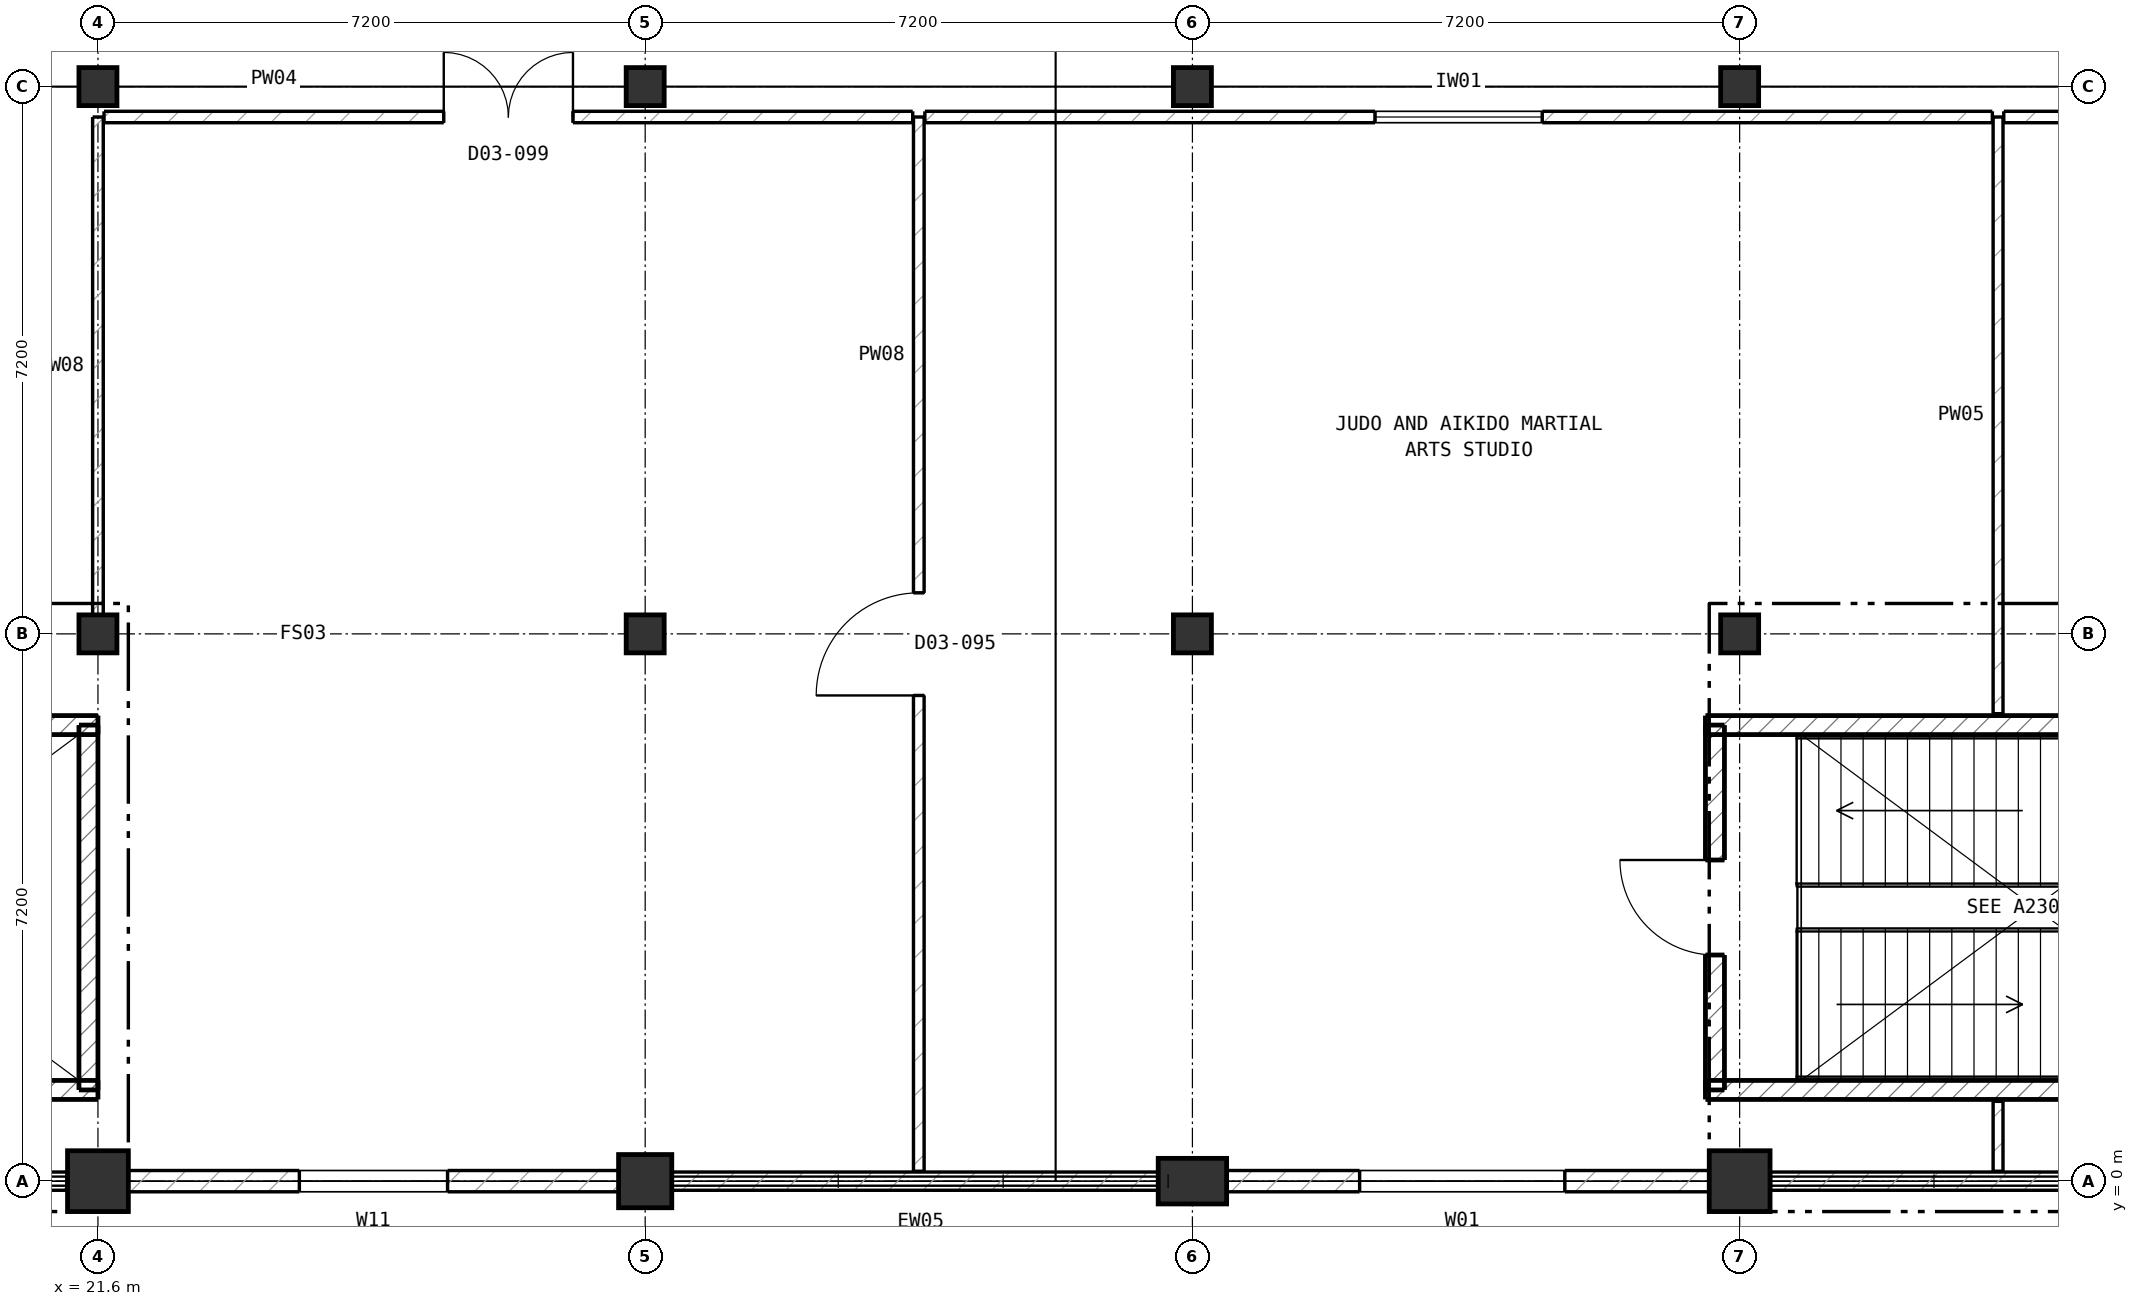
"""IFC4 building model, lengths in metres.
Left out: names, types, materials, properties, quantities, classifications, styles, units other than length and angle.
Written with IfcOpenShell. Run it as: python <this file> out.ifc"""

import sys

from ifc_helpers import new_model, si_unit, direction, frame, frame_2d, origin, origin_2d, place, context, subcontext, project, spatial, rectangle, extrude, element, fill, save


model = new_model("IFC4")
c1 = context("Model", 3, precision=1e-05, world=origin(), true_north=direction((0.0, 1.0)))
c2 = subcontext(c1, "Body", "Model", "MODEL_VIEW")
j1 = project(units=[si_unit("LENGTHUNIT", "METRE"), si_unit("PLANEANGLEUNIT", "RADIAN")], contexts=[c1])
p1 = place(None, origin())
s1 = spatial("IfcSite", under=j1, at=p1, CompositionType="ELEMENT")
p2 = place(p1, origin())
s2 = spatial("IfcBuilding", under=s1, at=p2, CompositionType="ELEMENT")
p3 = place(p2, frame((0.0, 0.0, 16.0)))
s3 = spatial("IfcBuildingStorey", under=s2, at=p3, CompositionType="ELEMENT", Elevation=16.0)
p4 = place(p3, frame((21.6, 0.0, 0.0), z_axis=(0.0, 0.0, 1.0), x_axis=(1.0, 0.0, 0.0)))
e1 = element("IfcColumn", 1, at=p4, inside=s3, PredefinedType="COLUMN", context=c2, shape_type="SweptSolid", body=[
    extrude(rectangle(XDim=0.8, YDim=0.8, at=origin_2d()), origin(), (0.0, 0.0, 1.0), 4.4),
])
for number, where, z_axis, x_axis in (
    (2, (21.6, 7.2, 0.0), (0.0, 0.0, 1.0), (1.0, 0.0, 0.0)),
    (3, (21.6, 14.4, 0.0), (0.0, 0.0, 1.0), (1.0, 0.0, 0.0)),
):
    element("IfcColumn", number, at=place(p3, frame(where, z_axis=z_axis, x_axis=x_axis)), inside=s3, PredefinedType="COLUMN", context=c2, shape_type="SweptSolid", body=[
        extrude(rectangle(XDim=0.5, YDim=0.5, at=origin_2d()), origin(), (0.0, 0.0, 1.0), 4.4),
    ])
p5 = place(p3, frame((28.8, 0.0, 0.0), z_axis=(0.0, 0.0, 1.0), x_axis=(1.0, 0.0, 0.0)))
e4 = element("IfcColumn", 4, at=p5, inside=s3, PredefinedType="COLUMN", context=c2, shape_type="SweptSolid", body=[
    extrude(rectangle(XDim=0.7, YDim=0.7, at=origin_2d()), origin(), (0.0, 0.0, 1.0), 4.4),
])
for number, where, z_axis, x_axis in (
    (5, (28.8, 7.2, 0.0), (0.0, 0.0, 1.0), (1.0, 0.0, 0.0)),
    (6, (28.8, 14.4, 0.0), (0.0, 0.0, 1.0), (1.0, 0.0, 0.0)),
):
    element("IfcColumn", number, at=place(p3, frame(where, z_axis=z_axis, x_axis=x_axis)), inside=s3, PredefinedType="COLUMN", context=c2, shape_type="SweptSolid", body=[
        extrude(rectangle(XDim=0.5, YDim=0.5, at=origin_2d()), origin(), (0.0, 0.0, 1.0), 4.4),
    ])
p6 = place(p3, frame((36.0, 0.0, 0.0), z_axis=(0.0, 0.0, 1.0), x_axis=(1.0, 0.0, 0.0)))
e7 = element("IfcColumn", 7, at=p6, inside=s3, PredefinedType="COLUMN", context=c2, shape_type="SweptSolid", body=[
    extrude(rectangle(XDim=0.6, YDim=0.9, at=origin_2d()), origin(), (0.0, 0.0, 1.0), 4.4),
])
for number, where, z_axis, x_axis in (
    (8, (36.0, 7.2, 0.0), (0.0, 0.0, 1.0), (1.0, 0.0, 0.0)),
    (9, (36.0, 14.4, 0.0), (0.0, 0.0, 1.0), (1.0, 0.0, 0.0)),
):
    element("IfcColumn", number, at=place(p3, frame(where, z_axis=z_axis, x_axis=x_axis)), inside=s3, PredefinedType="COLUMN", context=c2, shape_type="SweptSolid", body=[
        extrude(rectangle(XDim=0.5, YDim=0.5, at=origin_2d()), origin(), (0.0, 0.0, 1.0), 4.4),
    ])
p7 = place(p3, frame((43.2, 0.0, 0.0), z_axis=(0.0, 0.0, 1.0), x_axis=(1.0, 0.0, 0.0)))
e10 = element("IfcColumn", 10, at=p7, inside=s3, PredefinedType="COLUMN", context=c2, shape_type="SweptSolid", body=[
    extrude(rectangle(XDim=0.8, YDim=0.8, at=origin_2d()), origin(), (0.0, 0.0, 1.0), 4.4),
])
for number, where, z_axis, x_axis in (
    (11, (43.2, 7.2, 0.0), (0.0, 0.0, 1.0), (1.0, 0.0, 0.0)),
    (12, (43.2, 14.4, 0.0), (0.0, 0.0, 1.0), (1.0, 0.0, 0.0)),
):
    element("IfcColumn", number, at=place(p3, frame(where, z_axis=z_axis, x_axis=x_axis)), inside=s3, PredefinedType="COLUMN", context=c2, shape_type="SweptSolid", body=[
        extrude(rectangle(XDim=0.5, YDim=0.5, at=origin_2d()), origin(), (0.0, 0.0, 1.0), 4.4),
    ])
p8 = place(p3, frame((50.065, 0.0, 0.0), z_axis=(0.0, 0.0, 1.0), x_axis=(-1.0, 0.0, 0.0)))
e13 = element("IfcWall", 13, at=p8, inside=s3, PredefinedType="SOLIDWALL", context=c2, shape_type="SweptSolid", body=[
    extrude(rectangle(XDim=6.48, YDim=0.24, at=frame_2d((3.24, 0.0))), origin(), (0.0, 0.0, 1.0), 0.35),
])
p9 = place(p3, frame((42.815, 0.0, 0.0), z_axis=(0.0, 0.0, 1.0), x_axis=(-1.0, 0.0, 0.0)))
e14 = element("IfcWall", 14, at=p9, inside=s3, PredefinedType="SOLIDWALL", context=c2, shape_type="SweptSolid", body=[
    extrude(rectangle(XDim=6.53, YDim=0.28, at=frame_2d((3.265, 0.0))), origin(), (0.0, 0.0, 1.0), 3.675),
])
p10 = place(p9, frame((1.915, 0.0, 0.9)))
e15 = element("IfcOpeningElement", 15, at=p10, cuts=e14, PredefinedType="OPENING", context=c2, shape_type="SweptSolid", body=[
    extrude(rectangle(XDim=2.7, YDim=2.1, at=frame_2d((1.35, 1.05))), frame((0.0, 0.15, 0.0), z_axis=(0.0, -1.0, 0.0), x_axis=(1.0, 0.0, 0.0)), (0.0, 0.0, 1.0), 0.3),
])
p11 = place(p3, frame((35.715, 0.0, 0.0), z_axis=(0.0, 0.0, 1.0), x_axis=(-1.0, 0.0, 0.0)))
e16 = element("IfcWall", 16, at=p11, inside=s3, PredefinedType="SOLIDWALL", context=c2, shape_type="SweptSolid", body=[
    extrude(rectangle(XDim=6.58, YDim=0.24, at=frame_2d((3.29, 0.0))), origin(), (0.0, 0.0, 1.0), 0.35),
])
p12 = place(p3, frame((28.465, 0.0, 0.0), z_axis=(0.0, 0.0, 1.0), x_axis=(-1.0, 0.0, 0.0)))
e17 = element("IfcWall", 17, at=p12, inside=s3, PredefinedType="SOLIDWALL", context=c2, shape_type="SweptSolid", body=[
    extrude(rectangle(XDim=6.48, YDim=0.28, at=frame_2d((3.24, 0.0))), origin(), (0.0, 0.0, 1.0), 3.675),
])
p13 = place(p12, frame((2.265, 0.0, 1.0)))
e18 = element("IfcOpeningElement", 18, at=p13, cuts=e17, PredefinedType="OPENING", context=c2, shape_type="SweptSolid", body=[
    extrude(rectangle(XDim=1.95, YDim=1.65, at=frame_2d((0.975, 0.825))), frame((0.0, 0.15, 0.0), z_axis=(0.0, -1.0, 0.0), x_axis=(1.0, 0.0, 0.0)), (0.0, 0.0, 1.0), 0.3),
])
p14 = place(p3, frame((21.215, 0.0, 0.0), z_axis=(0.0, 0.0, 1.0), x_axis=(-1.0, 0.0, 0.0)))
e19 = element("IfcWall", 19, at=p14, inside=s3, PredefinedType="SOLIDWALL", context=c2, shape_type="SweptSolid", body=[
    extrude(rectangle(XDim=6.53, YDim=0.24, at=frame_2d((3.265, 0.0))), origin(), (0.0, 0.0, 1.0), 0.35),
])
p15 = place(p3, frame((13.95, 6.0, 0.0), z_axis=(0.0, 0.0, 1.0), x_axis=(1.0, 0.0, 0.0)))
e20 = element("IfcWall", 20, at=p15, inside=s3, PredefinedType="SHEAR", context=c2, shape_type="SweptSolid", body=[
    extrude(rectangle(XDim=7.65, YDim=0.25, at=frame_2d((3.825, 0.0))), origin(), (0.0, 0.0, 1.0), 4.4),
])
p16 = place(p3, frame((21.475, 6.0, 0.0), z_axis=(0.0, 0.0, 1.0), x_axis=(0.0, -1.0, 0.0)))
e21 = element("IfcWall", 21, at=p16, inside=s3, PredefinedType="SHEAR", context=c2, shape_type="SweptSolid", body=[
    extrude(rectangle(XDim=4.8, YDim=0.25, at=frame_2d((2.4, 0.0))), origin(), (0.0, 0.0, 1.0), 4.4),
])
p17 = place(p3, frame((21.6, 1.2, 0.0), z_axis=(0.0, 0.0, 1.0), x_axis=(-1.0, 0.0, 0.0)))
e22 = element("IfcWall", 22, at=p17, inside=s3, PredefinedType="SHEAR", context=c2, shape_type="SweptSolid", body=[
    extrude(rectangle(XDim=7.65, YDim=0.25, at=frame_2d((3.825, 0.0))), origin(), (0.0, 0.0, 1.0), 4.4),
])
p18 = place(p3, frame((42.875, 1.2, 0.0), z_axis=(0.0, 0.0, 1.0), x_axis=(0.0, 1.0, 0.0)))
e23 = element("IfcWall", 23, at=p18, inside=s3, PredefinedType="SHEAR", context=c2, shape_type="SweptSolid", body=[
    extrude(rectangle(XDim=4.8, YDim=0.25, at=frame_2d((2.4, 0.0))), origin(), (0.0, 0.0, 1.0), 4.4),
])
p19 = place(p18, frame((1.775, 0.0, 0.0)))
e24 = element("IfcOpeningElement", 24, at=p19, cuts=e23, PredefinedType="OPENING", context=c2, shape_type="SweptSolid", body=[
    extrude(rectangle(XDim=1.25, YDim=2.2, at=frame_2d((0.625, 1.1))), frame((0.0, 0.135, 0.0), z_axis=(0.0, -1.0, 0.0), x_axis=(1.0, 0.0, 0.0)), (0.0, 0.0, 1.0), 0.27),
])
for number, where, z_axis, x_axis in (
    (25, (42.75, 6.0, 0.0), (0.0, 0.0, 1.0), (1.0, 0.0, 0.0)),
    (26, (50.4, 1.2, 0.0), (0.0, 0.0, 1.0), (-1.0, 0.0, 0.0)),
):
    element("IfcWall", number, at=place(p3, frame(where, z_axis=z_axis, x_axis=x_axis)), inside=s3, PredefinedType="SHEAR", context=c2, shape_type="SweptSolid", body=[
        extrude(rectangle(XDim=7.65, YDim=0.25, at=frame_2d((3.825, 0.0))), origin(), (0.0, 0.0, 1.0), 4.4),
    ])
p20 = place(p3, frame((21.6, 7.45, 0.0), z_axis=(0.0, 0.0, 1.0), x_axis=(0.0, 1.0, 0.0)))
e27 = element("IfcWall", 27, at=p20, inside=s3, PredefinedType="PARTITIONING", context=c2, shape_type="SweptSolid", body=[
    extrude(rectangle(XDim=6.55, YDim=0.14, at=frame_2d((3.275, 0.0))), origin(), (0.0, 0.0, 1.0), 3.61),
])
p21 = place(p3, frame((46.6, 0.13, 0.0), z_axis=(0.0, 0.0, 1.0), x_axis=(0.0, 1.0, 0.0)))
e28 = element("IfcWall", 28, at=p21, inside=s3, PredefinedType="PARTITIONING", context=c2, shape_type="SweptSolid", body=[
    extrude(rectangle(XDim=0.92, YDim=0.13, at=frame_2d((0.46, 0.0))), origin(), (0.0, 0.0, 1.0), 4.12),
])
p22 = place(p3, frame((46.6, 6.15, 0.0), z_axis=(0.0, 0.0, 1.0), x_axis=(0.0, 1.0, 0.0)))
e29 = element("IfcWall", 29, at=p22, inside=s3, PredefinedType="PARTITIONING", context=c2, shape_type="SweptSolid", body=[
    extrude(rectangle(XDim=7.85, YDim=0.13, at=frame_2d((3.925, 0.0))), origin(), (0.0, 0.0, 1.0), 4.11),
])
p23 = place(p3, frame((32.4, 0.13, 0.0), z_axis=(0.0, 0.0, 1.0), x_axis=(0.0, 1.0, 0.0)))
e30 = element("IfcWall", 30, at=p23, inside=s3, PredefinedType="PARTITIONING", context=c2, shape_type="SweptSolid", body=[
    extrude(rectangle(XDim=13.87, YDim=0.14, at=frame_2d((6.935, 0.0))), origin(), (0.0, 0.0, 1.0), 4.12),
])
p24 = place(p23, frame((6.26, 0.0, 0.0)))
e31 = element("IfcOpeningElement", 31, at=p24, cuts=e30, PredefinedType="OPENING", context=c2, shape_type="SweptSolid", body=[
    extrude(rectangle(XDim=1.35, YDim=2.15, at=frame_2d((0.675, 1.075))), frame((0.0, 0.08, 0.0), z_axis=(0.0, -1.0, 0.0), x_axis=(1.0, 0.0, 0.0)), (0.0, 0.0, 1.0), 0.16),
])
p25 = place(p3, frame((21.68, 14.0, 0.0), z_axis=(0.0, 0.0, 1.0), x_axis=(1.0, 0.0, 0.0)))
e32 = element("IfcWall", 32, at=p25, inside=s3, PredefinedType="PARTITIONING", context=c2, shape_type="SweptSolid", body=[
    extrude(rectangle(XDim=10.64, YDim=0.15, at=frame_2d((5.32, 0.0))), origin(), (0.0, 0.0, 1.0), 4.11),
])
p26 = place(p25, frame((4.47, 0.0, 0.0)))
e33 = element("IfcOpeningElement", 33, at=p26, cuts=e32, PredefinedType="OPENING", context=c2, shape_type="SweptSolid", body=[
    extrude(rectangle(XDim=1.7, YDim=2.3, at=frame_2d((0.85, 1.15))), frame((0.0, 0.085, 0.0), z_axis=(0.0, -1.0, 0.0), x_axis=(1.0, 0.0, 0.0)), (0.0, 0.0, 1.0), 0.17),
])
p27 = place(p3, frame((32.48, 14.0, 0.0), z_axis=(0.0, 0.0, 1.0), x_axis=(1.0, 0.0, 0.0)))
e34 = element("IfcWall", 34, at=p27, inside=s3, PredefinedType="PARTITIONING", context=c2, shape_type="SweptSolid", body=[
    extrude(rectangle(XDim=14.045, YDim=0.15, at=frame_2d((7.022, 0.0))), origin(), (0.0, 0.0, 1.0), 4.11),
])
p28 = place(p27, frame((5.923, 0.0, 1.05)))
e35 = element("IfcOpeningElement", 35, at=p28, cuts=e34, PredefinedType="OPENING", context=c2, shape_type="SweptSolid", body=[
    extrude(rectangle(XDim=2.2, YDim=1.5, at=frame_2d((1.1, 0.75))), frame((0.0, 0.085, 0.0), z_axis=(0.0, -1.0, 0.0), x_axis=(1.0, 0.0, 0.0)), (0.0, 0.0, 1.0), 0.17),
])
p29 = place(p3, frame((46.675, 14.0, 0.0), z_axis=(0.0, 0.0, 1.0), x_axis=(1.0, 0.0, 0.0)))
e36 = element("IfcWall", 36, at=p29, inside=s3, PredefinedType="PARTITIONING", context=c2, shape_type="SweptSolid", body=[
    extrude(rectangle(XDim=9.05, YDim=0.15, at=frame_2d((4.525, 0.0))), origin(), (0.0, 0.0, 1.0), 4.11),
])
p30 = place(p29, frame((4.275, 0.0, 0.0)))
e37 = element("IfcOpeningElement", 37, at=p30, cuts=e36, PredefinedType="OPENING", context=c2, shape_type="SweptSolid", body=[
    extrude(rectangle(XDim=1.5, YDim=2.2, at=frame_2d((0.75, 1.1))), frame((0.0, 0.085, 0.0), z_axis=(0.0, -1.0, 0.0), x_axis=(1.0, 0.0, 0.0)), (0.0, 0.0, 1.0), 0.17),
])
p31 = place(p10, origin())
e38 = element("IfcWindow", 38, at=p31, inside=s3, PartitioningType="SINGLE_PANEL", PredefinedType="WINDOW", context=c2, shape_type="SweptSolid", body=[
    extrude(rectangle(XDim=2.7, YDim=2.1, at=frame_2d((1.35, 1.05))), frame((0.0, 0.03, 0.0), z_axis=(0.0, -1.0, 0.0), x_axis=(1.0, 0.0, 0.0)), (0.0, 0.0, 1.0), 0.06),
])
fill(e15, e38)
p32 = place(p13, origin())
e39 = element("IfcWindow", 39, at=p32, inside=s3, PartitioningType="SINGLE_PANEL", PredefinedType="WINDOW", context=c2, shape_type="SweptSolid", body=[
    extrude(rectangle(XDim=1.95, YDim=1.65, at=frame_2d((0.975, 0.825))), frame((0.0, 0.03, 0.0), z_axis=(0.0, -1.0, 0.0), x_axis=(1.0, 0.0, 0.0)), (0.0, 0.0, 1.0), 0.06),
])
fill(e18, e39)
p33 = place(p19, origin())
e40 = element("IfcDoor", 40, at=p33, inside=s3, OperationType="SINGLE_SWING_RIGHT", PredefinedType="DOOR", context=c2, shape_type="SweptSolid", body=[
    extrude(rectangle(XDim=1.25, YDim=2.2, at=frame_2d((0.625, 1.1))), frame((0.0, 0.025, 0.0), z_axis=(0.0, -1.0, 0.0), x_axis=(1.0, 0.0, 0.0)), (0.0, 0.0, 1.0), 0.05),
])
fill(e24, e40)
p34 = place(p24, origin())
e41 = element("IfcDoor", 41, at=p34, inside=s3, OperationType="SINGLE_SWING_LEFT", PredefinedType="DOOR", context=c2, shape_type="SweptSolid", body=[
    extrude(rectangle(XDim=1.35, YDim=2.15, at=frame_2d((0.675, 1.075))), frame((0.0, 0.025, 0.0), z_axis=(0.0, -1.0, 0.0), x_axis=(1.0, 0.0, 0.0)), (0.0, 0.0, 1.0), 0.05),
])
fill(e31, e41)
p35 = place(p26, origin())
e42 = element("IfcDoor", 42, at=p35, inside=s3, OperationType="DOUBLE_DOOR_SINGLE_SWING", PredefinedType="DOOR", context=c2, shape_type="SweptSolid", body=[
    extrude(rectangle(XDim=1.7, YDim=2.3, at=frame_2d((0.85, 1.15))), frame((0.0, 0.025, 0.0), z_axis=(0.0, -1.0, 0.0), x_axis=(1.0, 0.0, 0.0)), (0.0, 0.0, 1.0), 0.05),
])
fill(e33, e42)
p36 = place(p28, origin())
e43 = element("IfcWindow", 43, at=p36, inside=s3, PartitioningType="SINGLE_PANEL", PredefinedType="WINDOW", context=c2, shape_type="SweptSolid", body=[
    extrude(rectangle(XDim=2.2, YDim=1.5, at=frame_2d((1.1, 0.75))), frame((0.0, 0.03, 0.0), z_axis=(0.0, -1.0, 0.0), x_axis=(1.0, 0.0, 0.0)), (0.0, 0.0, 1.0), 0.06),
])
fill(e35, e43)
save(model, sys.argv[1])
